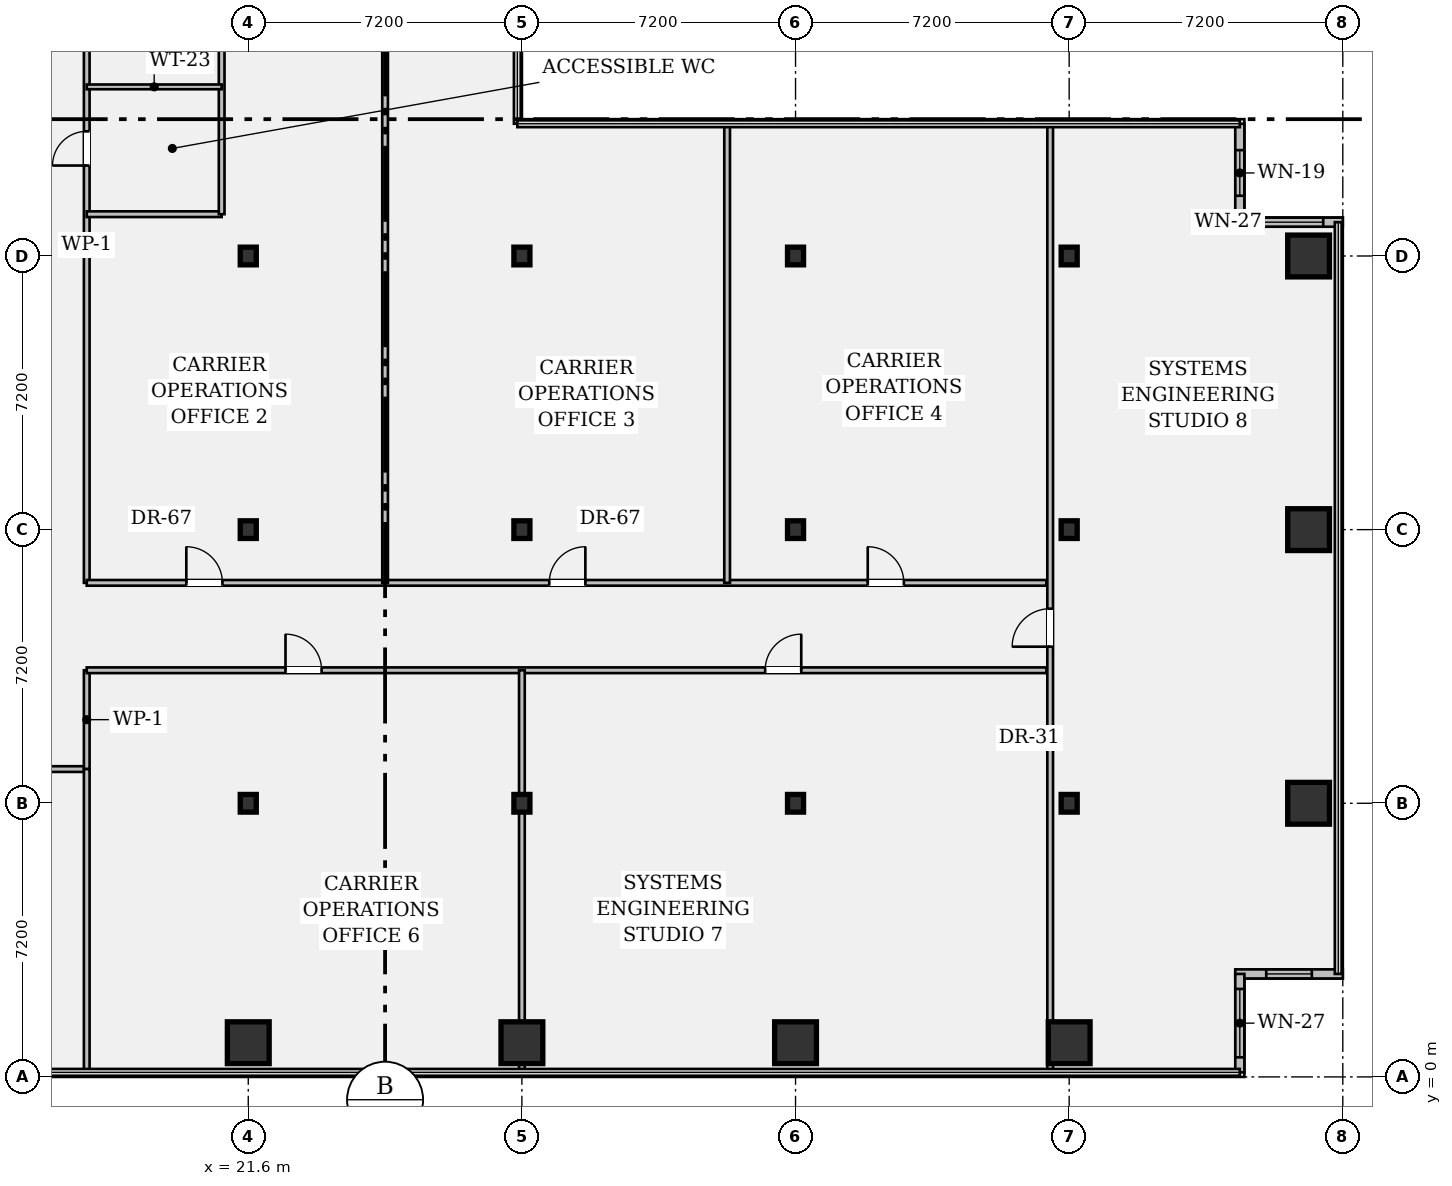
"""IFC4 building model, lengths in metres.
Left out: names, types, materials, properties, quantities, classifications, styles, units other than length and angle.
Written with IfcOpenShell. Run it as: python <this file> out.ifc"""

import sys

from ifc_helpers import new_model, si_unit, direction, frame, frame_2d, origin, origin_2d, place, context, subcontext, project, spatial, rectangle, hollow_rectangle, i_section, extrude, element, fill, save


model = new_model("IFC4")
c1 = context("Model", 3, precision=1e-05, world=origin(), true_north=direction((0.0, 1.0)))
c2 = subcontext(c1, "Body", "Model", "MODEL_VIEW")
j1 = project(units=[si_unit("LENGTHUNIT", "METRE"), si_unit("PLANEANGLEUNIT", "RADIAN")], contexts=[c1])
p1 = place(None, origin())
s1 = spatial("IfcSite", under=j1, at=p1, CompositionType="ELEMENT")
p2 = place(p1, origin())
s2 = spatial("IfcBuilding", under=s1, at=p2, CompositionType="ELEMENT")
p3 = place(p2, frame((0.0, 0.0, 35.0)))
s3 = spatial("IfcBuildingStorey", under=s2, at=p3, CompositionType="ELEMENT", Elevation=35.0)
p4 = place(p3, frame((21.6, 0.9, 0.0), z_axis=(0.0, 0.0, 1.0), x_axis=(1.0, 0.0, 0.0)))
e1 = element("IfcColumn", 1, at=p4, inside=s3, PredefinedType="COLUMN", context=c2, shape_type="SweptSolid", body=[
    extrude(hollow_rectangle(XDim=1.1, YDim=1.1, WallThickness=0.07, at=origin_2d()), origin(), (0.0, 0.0, 1.0), 3.57),
])
for number, where, z_axis, x_axis in (
    (2, (21.6, 7.2, 0.0), (0.0, 0.0, 1.0), (1.0, 0.0, 0.0)),
    (3, (21.6, 14.4, 0.0), (0.0, 0.0, 1.0), (1.0, 0.0, 0.0)),
    (4, (21.6, 21.6, 0.0), (0.0, 0.0, 1.0), (1.0, 0.0, 0.0)),
):
    element("IfcColumn", number, at=place(p3, frame(where, z_axis=z_axis, x_axis=x_axis)), inside=s3, PredefinedType="COLUMN", context=c2, shape_type="SweptSolid", body=[
        extrude(i_section(OverallWidth=0.422, OverallDepth=0.465, WebThickness=0.045, FlangeThickness=0.073, FilletRadius=0.018, at=origin_2d()), origin(), (0.0, 0.0, 1.0), 3.57),
    ])
p5 = place(p3, frame((28.8, 0.9, 0.0), z_axis=(0.0, 0.0, 1.0), x_axis=(1.0, 0.0, 0.0)))
e5 = element("IfcColumn", 5, at=p5, inside=s3, PredefinedType="COLUMN", context=c2, shape_type="SweptSolid", body=[
    extrude(hollow_rectangle(XDim=1.1, YDim=1.1, WallThickness=0.07, at=origin_2d()), origin(), (0.0, 0.0, 1.0), 3.57),
])
for number, where, z_axis, x_axis in (
    (6, (28.8, 7.2, 0.0), (0.0, 0.0, 1.0), (1.0, 0.0, 0.0)),
    (7, (28.8, 14.4, 0.0), (0.0, 0.0, 1.0), (1.0, 0.0, 0.0)),
    (8, (28.8, 21.6, 0.0), (0.0, 0.0, 1.0), (1.0, 0.0, 0.0)),
):
    element("IfcColumn", number, at=place(p3, frame(where, z_axis=z_axis, x_axis=x_axis)), inside=s3, PredefinedType="COLUMN", context=c2, shape_type="SweptSolid", body=[
        extrude(i_section(OverallWidth=0.422, OverallDepth=0.465, WebThickness=0.045, FlangeThickness=0.073, FilletRadius=0.018, at=origin_2d()), origin(), (0.0, 0.0, 1.0), 3.57),
    ])
p6 = place(p3, frame((36.0, 0.9, 0.0), z_axis=(0.0, 0.0, 1.0), x_axis=(1.0, 0.0, 0.0)))
e9 = element("IfcColumn", 9, at=p6, inside=s3, PredefinedType="COLUMN", context=c2, shape_type="SweptSolid", body=[
    extrude(hollow_rectangle(XDim=1.1, YDim=1.1, WallThickness=0.07, at=origin_2d()), origin(), (0.0, 0.0, 1.0), 3.57),
])
for number, where, z_axis, x_axis in (
    (10, (36.0, 7.2, 0.0), (0.0, 0.0, 1.0), (1.0, 0.0, 0.0)),
    (11, (36.0, 14.4, 0.0), (0.0, 0.0, 1.0), (1.0, 0.0, 0.0)),
    (12, (36.0, 21.6, 0.0), (0.0, 0.0, 1.0), (1.0, 0.0, 0.0)),
):
    element("IfcColumn", number, at=place(p3, frame(where, z_axis=z_axis, x_axis=x_axis)), inside=s3, PredefinedType="COLUMN", context=c2, shape_type="SweptSolid", body=[
        extrude(i_section(OverallWidth=0.422, OverallDepth=0.465, WebThickness=0.045, FlangeThickness=0.073, FilletRadius=0.018, at=origin_2d()), origin(), (0.0, 0.0, 1.0), 3.57),
    ])
p7 = place(p3, frame((43.2, 0.9, 0.0), z_axis=(0.0, 0.0, 1.0), x_axis=(1.0, 0.0, 0.0)))
e13 = element("IfcColumn", 13, at=p7, inside=s3, PredefinedType="COLUMN", context=c2, shape_type="SweptSolid", body=[
    extrude(hollow_rectangle(XDim=1.1, YDim=1.1, WallThickness=0.07, at=origin_2d()), origin(), (0.0, 0.0, 1.0), 3.57),
])
for number, where, z_axis, x_axis in (
    (14, (43.2, 7.2, 0.0), (0.0, 0.0, 1.0), (1.0, 0.0, 0.0)),
    (15, (43.2, 14.4, 0.0), (0.0, 0.0, 1.0), (1.0, 0.0, 0.0)),
    (16, (43.2, 21.6, 0.0), (0.0, 0.0, 1.0), (1.0, 0.0, 0.0)),
):
    element("IfcColumn", number, at=place(p3, frame(where, z_axis=z_axis, x_axis=x_axis)), inside=s3, PredefinedType="COLUMN", context=c2, shape_type="SweptSolid", body=[
        extrude(i_section(OverallWidth=0.422, OverallDepth=0.465, WebThickness=0.045, FlangeThickness=0.073, FilletRadius=0.018, at=origin_2d()), origin(), (0.0, 0.0, 1.0), 3.57),
    ])
for number, where, z_axis, x_axis in (
    (17, (49.5, 7.2, 0.0), (0.0, 0.0, 1.0), (1.0, 0.0, 0.0)),
    (18, (49.5, 14.4, 0.0), (0.0, 0.0, 1.0), (1.0, 0.0, 0.0)),
    (19, (49.5, 21.6, 0.0), (0.0, 0.0, 1.0), (1.0, 0.0, 0.0)),
):
    element("IfcColumn", number, at=place(p3, frame(where, z_axis=z_axis, x_axis=x_axis)), inside=s3, PredefinedType="COLUMN", context=c2, shape_type="SweptSolid", body=[
        extrude(hollow_rectangle(XDim=1.1, YDim=1.1, WallThickness=0.07, at=origin_2d()), origin(), (0.0, 0.0, 1.0), 3.57),
    ])
p8 = place(p3, frame((47.69, 25.08, 0.0), z_axis=(0.0, 0.0, 1.0), x_axis=(0.0, -1.0, 0.0)))
e20 = element("IfcWall", 20, at=p8, inside=s3, PredefinedType="STANDARD", context=c2, shape_type="SweptSolid", body=[
    extrude(rectangle(XDim=2.59, YDim=0.24, at=frame_2d((1.295, 0.0))), origin(), (0.0, 0.0, 1.0), 3.57),
])
p9 = place(p8, frame((0.695, 0.0, 0.95)))
e21 = element("IfcOpeningElement", 21, at=p9, cuts=e20, PredefinedType="OPENING", context=c2, shape_type="SweptSolid", body=[
    extrude(rectangle(XDim=1.2, YDim=1.8, at=frame_2d((0.6, 0.9))), frame((0.0, 0.132, 0.0), z_axis=(0.0, -1.0, 0.0), x_axis=(1.0, 0.0, 0.0)), (0.0, 0.0, 1.0), 0.264),
])
p10 = place(p3, frame((47.57, 22.49, 0.0), z_axis=(0.0, 0.0, 1.0), x_axis=(1.0, 0.0, 0.0)))
e22 = element("IfcWall", 22, at=p10, inside=s3, PredefinedType="STANDARD", context=c2, shape_type="SweptSolid", body=[
    extrude(rectangle(XDim=2.83, YDim=0.24, at=frame_2d((1.415, 0.0))), origin(), (0.0, 0.0, 1.0), 3.57),
])
p11 = place(p10, frame((0.515, 0.0, 0.95)))
e23 = element("IfcOpeningElement", 23, at=p11, cuts=e22, PredefinedType="OPENING", context=c2, shape_type="SweptSolid", body=[
    extrude(rectangle(XDim=1.8, YDim=1.35, at=frame_2d((0.9, 0.675))), frame((0.0, 0.132, 0.0), z_axis=(0.0, -1.0, 0.0), x_axis=(1.0, 0.0, 0.0)), (0.0, 0.0, 1.0), 0.264),
])
p12 = place(p3, frame((50.4, 2.71, 0.0), z_axis=(0.0, 0.0, 1.0), x_axis=(-1.0, 0.0, 0.0)))
e24 = element("IfcWall", 24, at=p12, inside=s3, PredefinedType="STANDARD", context=c2, shape_type="SweptSolid", body=[
    extrude(rectangle(XDim=2.83, YDim=0.24, at=frame_2d((1.415, 0.0))), origin(), (0.0, 0.0, 1.0), 3.57),
])
p13 = place(p12, frame((0.815, 0.0, 0.95)))
e25 = element("IfcOpeningElement", 25, at=p13, cuts=e24, PredefinedType="OPENING", context=c2, shape_type="SweptSolid", body=[
    extrude(rectangle(XDim=1.2, YDim=1.8, at=frame_2d((0.6, 0.9))), frame((0.0, 0.132, 0.0), z_axis=(0.0, -1.0, 0.0), x_axis=(1.0, 0.0, 0.0)), (0.0, 0.0, 1.0), 0.264),
])
p14 = place(p3, frame((47.69, 2.71, 0.0), z_axis=(0.0, 0.0, 1.0), x_axis=(0.0, -1.0, 0.0)))
e26 = element("IfcWall", 26, at=p14, inside=s3, PredefinedType="STANDARD", context=c2, shape_type="SweptSolid", body=[
    extrude(rectangle(XDim=2.59, YDim=0.24, at=frame_2d((1.295, 0.0))), origin(), (0.0, 0.0, 1.0), 3.57),
])
p15 = place(p14, frame((0.395, 0.0, 0.95)))
e27 = element("IfcOpeningElement", 27, at=p15, cuts=e26, PredefinedType="OPENING", context=c2, shape_type="SweptSolid", body=[
    extrude(rectangle(XDim=1.8, YDim=1.35, at=frame_2d((0.9, 0.675))), frame((0.0, 0.132, 0.0), z_axis=(0.0, -1.0, 0.0), x_axis=(1.0, 0.0, 0.0)), (0.0, 0.0, 1.0), 0.264),
])
p16 = place(p3, frame((14.4, 8.1, 0.0), z_axis=(0.0, 0.0, 1.0), x_axis=(1.0, 0.0, 0.0)))
e28 = element("IfcWall", 28, at=p16, inside=s3, PredefinedType="PARTITIONING", context=c2, shape_type="SweptSolid", body=[
    extrude(rectangle(XDim=2.95, YDim=0.15, at=frame_2d((1.475, 0.0))), origin(), (0.0, 0.0, 1.0), 2.628),
])
p17 = place(p16, frame((0.95, 0.0, 0.0)))
e29 = element("IfcOpeningElement", 29, at=p17, cuts=e28, PredefinedType="OPENING", context=c2, shape_type="SweptSolid", body=[
    extrude(rectangle(XDim=0.95, YDim=2.15, at=frame_2d((0.475, 1.075))), frame((0.0, 0.087, 0.0), z_axis=(0.0, -1.0, 0.0), x_axis=(1.0, 0.0, 0.0)), (0.0, 0.0, 1.0), 0.174),
])
p18 = place(p3, frame((17.35, 8.1, 0.0), z_axis=(0.0, 0.0, 1.0), x_axis=(0.0, 1.0, 0.0)))
e30 = element("IfcWall", 30, at=p18, inside=s3, PredefinedType="PARTITIONING", context=c2, shape_type="SweptSolid", body=[
    extrude(rectangle(XDim=2.6, YDim=0.15, at=frame_2d((1.3, 0.0))), origin(), (0.0, 0.0, 1.0), 3.57),
])
p19 = place(p3, frame((17.35, 13.0, 0.0), z_axis=(0.0, 0.0, 1.0), x_axis=(0.0, 1.0, 0.0)))
e31 = element("IfcWall", 31, at=p19, inside=s3, PredefinedType="PARTITIONING", context=c2, shape_type="SweptSolid", body=[
    extrude(rectangle(XDim=22.2, YDim=0.15, at=frame_2d((11.1, 0.0))), origin(), (0.0, 0.0, 1.0), 2.628),
])
p20 = place(p19, frame((10.98, 0.0, 0.0)))
e32 = element("IfcOpeningElement", 32, at=p20, cuts=e31, PredefinedType="OPENING", context=c2, shape_type="SweptSolid", body=[
    extrude(rectangle(XDim=0.9, YDim=2.15, at=frame_2d((0.45, 1.075))), frame((0.0, 0.087, 0.0), z_axis=(0.0, -1.0, 0.0), x_axis=(1.0, 0.0, 0.0)), (0.0, 0.0, 1.0), 0.174),
])
p21 = place(p19, frame((14.23, 0.0, 0.0)))
e33 = element("IfcOpeningElement", 33, at=p21, cuts=e31, PredefinedType="OPENING", context=c2, shape_type="SweptSolid", body=[
    extrude(rectangle(XDim=0.9, YDim=2.15, at=frame_2d((0.45, 1.075))), frame((0.0, 0.087, 0.0), z_axis=(0.0, -1.0, 0.0), x_axis=(1.0, 0.0, 0.0)), (0.0, 0.0, 1.0), 0.174),
])
p22 = place(p19, frame((17.48, 0.0, 0.0)))
e34 = element("IfcOpeningElement", 34, at=p22, cuts=e31, PredefinedType="OPENING", context=c2, shape_type="SweptSolid", body=[
    extrude(rectangle(XDim=0.9, YDim=2.15, at=frame_2d((0.45, 1.075))), frame((0.0, 0.087, 0.0), z_axis=(0.0, -1.0, 0.0), x_axis=(1.0, 0.0, 0.0)), (0.0, 0.0, 1.0), 0.174),
])
p23 = place(p19, frame((20.72, 0.0, 0.0)))
e35 = element("IfcOpeningElement", 35, at=p23, cuts=e31, PredefinedType="OPENING", context=c2, shape_type="SweptSolid", body=[
    extrude(rectangle(XDim=0.9, YDim=2.15, at=frame_2d((0.45, 1.075))), frame((0.0, 0.087, 0.0), z_axis=(0.0, -1.0, 0.0), x_axis=(1.0, 0.0, 0.0)), (0.0, 0.0, 1.0), 0.174),
])
p24 = place(p3, frame((17.35, 10.7, 0.0), z_axis=(0.0, 0.0, 1.0), x_axis=(1.0, 0.0, 0.0)))
e36 = element("IfcWall", 36, at=p24, inside=s3, PredefinedType="PARTITIONING", context=c2, shape_type="SweptSolid", body=[
    extrude(rectangle(XDim=25.25, YDim=0.15, at=frame_2d((12.625, 0.0))), origin(), (0.0, 0.0, 1.0), 2.628),
])
p25 = place(p24, frame((5.23, 0.0, 0.0)))
e37 = element("IfcOpeningElement", 37, at=p25, cuts=e36, PredefinedType="OPENING", context=c2, shape_type="SweptSolid", body=[
    extrude(rectangle(XDim=0.95, YDim=2.15, at=frame_2d((0.475, 1.075))), frame((0.0, 0.087, 0.0), z_axis=(0.0, -1.0, 0.0), x_axis=(1.0, 0.0, 0.0)), (0.0, 0.0, 1.0), 0.174),
])
p26 = place(p24, frame((17.85, 0.0, 0.0)))
e38 = element("IfcOpeningElement", 38, at=p26, cuts=e36, PredefinedType="OPENING", context=c2, shape_type="SweptSolid", body=[
    extrude(rectangle(XDim=0.95, YDim=2.15, at=frame_2d((0.475, 1.075))), frame((0.0, 0.087, 0.0), z_axis=(0.0, -1.0, 0.0), x_axis=(1.0, 0.0, 0.0)), (0.0, 0.0, 1.0), 0.174),
])
p27 = place(p3, frame((17.35, 13.0, 0.0), z_axis=(0.0, 0.0, 1.0), x_axis=(1.0, 0.0, 0.0)))
e39 = element("IfcWall", 39, at=p27, inside=s3, PredefinedType="PARTITIONING", context=c2, shape_type="SweptSolid", body=[
    extrude(rectangle(XDim=25.25, YDim=0.15, at=frame_2d((12.625, 0.0))), origin(), (0.0, 0.0, 1.0), 2.628),
])
p28 = place(p27, frame((2.62, 0.0, 0.0)))
e40 = element("IfcOpeningElement", 40, at=p28, cuts=e39, PredefinedType="OPENING", context=c2, shape_type="SweptSolid", body=[
    extrude(rectangle(XDim=0.95, YDim=2.15, at=frame_2d((0.475, 1.075))), frame((0.0, 0.087, 0.0), z_axis=(0.0, -1.0, 0.0), x_axis=(1.0, 0.0, 0.0)), (0.0, 0.0, 1.0), 0.174),
])
p29 = place(p27, frame((12.17, 0.0, 0.0)))
e41 = element("IfcOpeningElement", 41, at=p29, cuts=e39, PredefinedType="OPENING", context=c2, shape_type="SweptSolid", body=[
    extrude(rectangle(XDim=0.95, YDim=2.15, at=frame_2d((0.475, 1.075))), frame((0.0, 0.087, 0.0), z_axis=(0.0, -1.0, 0.0), x_axis=(1.0, 0.0, 0.0)), (0.0, 0.0, 1.0), 0.174),
])
p30 = place(p27, frame((20.55, 0.0, 0.0)))
e42 = element("IfcOpeningElement", 42, at=p30, cuts=e39, PredefinedType="OPENING", context=c2, shape_type="SweptSolid", body=[
    extrude(rectangle(XDim=0.95, YDim=2.15, at=frame_2d((0.475, 1.075))), frame((0.0, 0.087, 0.0), z_axis=(0.0, -1.0, 0.0), x_axis=(1.0, 0.0, 0.0)), (0.0, 0.0, 1.0), 0.174),
])
p31 = place(p3, frame((42.7, 0.12, 0.0), z_axis=(0.0, 0.0, 1.0), x_axis=(0.0, 1.0, 0.0)))
e43 = element("IfcWall", 43, at=p31, inside=s3, PredefinedType="PARTITIONING", context=c2, shape_type="SweptSolid", body=[
    extrude(rectangle(XDim=24.96, YDim=0.15, at=frame_2d((12.48, 0.0))), origin(), (0.0, 0.0, 1.0), 2.628),
])
p32 = place(p31, frame((11.2, 0.0, 0.0)))
e44 = element("IfcOpeningElement", 44, at=p32, cuts=e43, PredefinedType="OPENING", context=c2, shape_type="SweptSolid", body=[
    extrude(rectangle(XDim=1.0, YDim=2.15, at=frame_2d((0.5, 1.075))), frame((0.0, 0.087, 0.0), z_axis=(0.0, -1.0, 0.0), x_axis=(1.0, 0.0, 0.0)), (0.0, 0.0, 1.0), 0.174),
])
p33 = place(p3, frame((17.35, 22.7, 0.0), z_axis=(0.0, 0.0, 1.0), x_axis=(1.0, 0.0, 0.0)))
e45 = element("IfcWall", 45, at=p33, inside=s3, PredefinedType="PARTITIONING", context=c2, shape_type="SweptSolid", body=[
    extrude(rectangle(XDim=3.55, YDim=0.15, at=frame_2d((1.775, 0.0))), origin(), (0.0, 0.0, 1.0), 3.088),
])
p34 = place(p3, frame((20.9, 22.7, 0.0), z_axis=(0.0, 0.0, 1.0), x_axis=(0.0, 1.0, 0.0)))
e46 = element("IfcWall", 46, at=p34, inside=s3, PredefinedType="PARTITIONING", context=c2, shape_type="SweptSolid", body=[
    extrude(rectangle(XDim=12.5, YDim=0.15, at=frame_2d((6.25, 0.0))), origin(), (0.0, 0.0, 1.0), 2.628),
])
p35 = place(p3, frame((17.35, 26.05, 0.0), z_axis=(0.0, 0.0, 1.0), x_axis=(1.0, 0.0, 0.0)))
e47 = element("IfcWall", 47, at=p35, inside=s3, PredefinedType="PARTITIONING", context=c2, shape_type="SweptSolid", body=[
    extrude(rectangle(XDim=3.55, YDim=0.125, at=frame_2d((1.775, 0.0))), origin(), (0.0, 0.0, 1.0), 3.088),
])
p36 = place(p3, frame((25.2, 13.0, 0.0), z_axis=(0.0, 0.0, 1.0), x_axis=(0.0, 1.0, 0.0)))
e48 = element("IfcWall", 48, at=p36, inside=s3, PredefinedType="PARTITIONING", context=c2, shape_type="SweptSolid", body=[
    extrude(rectangle(XDim=22.9, YDim=0.15, at=frame_2d((11.45, 0.0))), origin(), (0.0, 0.0, 1.0), 2.628),
])
p37 = place(p3, frame((34.2, 13.0, 0.0), z_axis=(0.0, 0.0, 1.0), x_axis=(0.0, 1.0, 0.0)))
e49 = element("IfcWall", 49, at=p37, inside=s3, PredefinedType="PARTITIONING", context=c2, shape_type="SweptSolid", body=[
    extrude(rectangle(XDim=12.05, YDim=0.15, at=frame_2d((6.025, 0.0))), origin(), (0.0, 0.0, 1.0), 2.628),
])
p38 = place(p3, frame((17.35, 0.12, 0.0), z_axis=(0.0, 0.0, 1.0), x_axis=(0.0, 1.0, 0.0)))
e50 = element("IfcWall", 50, at=p38, inside=s3, PredefinedType="PARTITIONING", context=c2, shape_type="SweptSolid", body=[
    extrude(rectangle(XDim=7.98, YDim=0.15, at=frame_2d((3.99, 0.0))), origin(), (0.0, 0.0, 1.0), 2.628),
])
p39 = place(p3, frame((28.8, 0.12, 0.0), z_axis=(0.0, 0.0, 1.0), x_axis=(0.0, 1.0, 0.0)))
e51 = element("IfcWall", 51, at=p39, inside=s3, PredefinedType="PARTITIONING", context=c2, shape_type="SweptSolid", body=[
    extrude(rectangle(XDim=10.58, YDim=0.15, at=frame_2d((5.29, 0.0))), origin(), (0.0, 0.0, 1.0), 2.628),
])
p40 = place(p9, origin())
e52 = element("IfcWindow", 52, at=p40, inside=s3, PartitioningType="SINGLE_PANEL", PredefinedType="WINDOW", context=c2, shape_type="SweptSolid", body=[
    extrude(rectangle(XDim=1.2, YDim=1.8, at=frame_2d((0.6, 0.9))), frame((0.0, 0.03, 0.0), z_axis=(0.0, -1.0, 0.0), x_axis=(1.0, 0.0, 0.0)), (0.0, 0.0, 1.0), 0.06),
])
fill(e21, e52)
p41 = place(p11, origin())
e53 = element("IfcWindow", 53, at=p41, inside=s3, PartitioningType="SINGLE_PANEL", PredefinedType="WINDOW", context=c2, shape_type="SweptSolid", body=[
    extrude(rectangle(XDim=1.8, YDim=1.35, at=frame_2d((0.9, 0.675))), frame((0.0, 0.03, 0.0), z_axis=(0.0, -1.0, 0.0), x_axis=(1.0, 0.0, 0.0)), (0.0, 0.0, 1.0), 0.06),
])
fill(e23, e53)
p42 = place(p13, origin())
e54 = element("IfcWindow", 54, at=p42, inside=s3, PartitioningType="SINGLE_PANEL", PredefinedType="WINDOW", context=c2, shape_type="SweptSolid", body=[
    extrude(rectangle(XDim=1.2, YDim=1.8, at=frame_2d((0.6, 0.9))), frame((0.0, 0.03, 0.0), z_axis=(0.0, -1.0, 0.0), x_axis=(1.0, 0.0, 0.0)), (0.0, 0.0, 1.0), 0.06),
])
fill(e25, e54)
p43 = place(p15, origin())
e55 = element("IfcWindow", 55, at=p43, inside=s3, PartitioningType="SINGLE_PANEL", PredefinedType="WINDOW", context=c2, shape_type="SweptSolid", body=[
    extrude(rectangle(XDim=1.8, YDim=1.35, at=frame_2d((0.9, 0.675))), frame((0.0, 0.03, 0.0), z_axis=(0.0, -1.0, 0.0), x_axis=(1.0, 0.0, 0.0)), (0.0, 0.0, 1.0), 0.06),
])
fill(e27, e55)
p44 = place(p20, origin())
e56 = element("IfcDoor", 56, at=p44, inside=s3, OperationType="SINGLE_SWING_LEFT", PredefinedType="DOOR", context=c2, shape_type="SweptSolid", body=[
    extrude(rectangle(XDim=0.9, YDim=2.15, at=frame_2d((0.45, 1.075))), frame((0.0, 0.025, 0.0), z_axis=(0.0, -1.0, 0.0), x_axis=(1.0, 0.0, 0.0)), (0.0, 0.0, 1.0), 0.05),
])
fill(e32, e56)
p45 = place(p28, origin())
e57 = element("IfcDoor", 57, at=p45, inside=s3, OperationType="SINGLE_SWING_LEFT", PredefinedType="DOOR", context=c2, shape_type="SweptSolid", body=[
    extrude(rectangle(XDim=0.95, YDim=2.15, at=frame_2d((0.475, 1.075))), frame((0.0, 0.025, 0.0), z_axis=(0.0, -1.0, 0.0), x_axis=(1.0, 0.0, 0.0)), (0.0, 0.0, 1.0), 0.05),
])
fill(e40, e57)
p46 = place(p29, origin())
e58 = element("IfcDoor", 58, at=p46, inside=s3, OperationType="SINGLE_SWING_RIGHT", PredefinedType="DOOR", context=c2, shape_type="SweptSolid", body=[
    extrude(rectangle(XDim=0.95, YDim=2.15, at=frame_2d((0.475, 1.075))), frame((0.0, 0.025, 0.0), z_axis=(0.0, -1.0, 0.0), x_axis=(1.0, 0.0, 0.0)), (0.0, 0.0, 1.0), 0.05),
])
fill(e41, e58)
p47 = place(p30, origin())
e59 = element("IfcDoor", 59, at=p47, inside=s3, OperationType="SINGLE_SWING_LEFT", PredefinedType="DOOR", context=c2, shape_type="SweptSolid", body=[
    extrude(rectangle(XDim=0.95, YDim=2.15, at=frame_2d((0.475, 1.075))), frame((0.0, 0.025, 0.0), z_axis=(0.0, -1.0, 0.0), x_axis=(1.0, 0.0, 0.0)), (0.0, 0.0, 1.0), 0.05),
])
fill(e42, e59)
p48 = place(p25, origin())
e60 = element("IfcDoor", 60, at=p48, inside=s3, OperationType="SINGLE_SWING_LEFT", PredefinedType="DOOR", context=c2, shape_type="SweptSolid", body=[
    extrude(rectangle(XDim=0.95, YDim=2.15, at=frame_2d((0.475, 1.075))), frame((0.0, 0.025, 0.0), z_axis=(0.0, -1.0, 0.0), x_axis=(1.0, 0.0, 0.0)), (0.0, 0.0, 1.0), 0.05),
])
fill(e37, e60)
p49 = place(p26, origin())
e61 = element("IfcDoor", 61, at=p49, inside=s3, OperationType="SINGLE_SWING_RIGHT", PredefinedType="DOOR", context=c2, shape_type="SweptSolid", body=[
    extrude(rectangle(XDim=0.95, YDim=2.15, at=frame_2d((0.475, 1.075))), frame((0.0, 0.025, 0.0), z_axis=(0.0, -1.0, 0.0), x_axis=(1.0, 0.0, 0.0)), (0.0, 0.0, 1.0), 0.05),
])
fill(e38, e61)
p50 = place(p32, origin())
e62 = element("IfcDoor", 62, at=p50, inside=s3, OperationType="SINGLE_SWING_LEFT", PredefinedType="DOOR", context=c2, shape_type="SweptSolid", body=[
    extrude(rectangle(XDim=1.0, YDim=2.15, at=frame_2d((0.5, 1.075))), frame((0.0, 0.025, 0.0), z_axis=(0.0, -1.0, 0.0), x_axis=(1.0, 0.0, 0.0)), (0.0, 0.0, 1.0), 0.05),
])
fill(e44, e62)
save(model, sys.argv[1])
